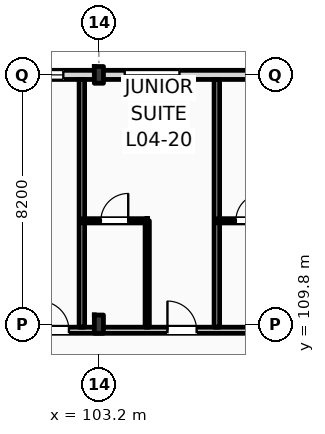
"""IFC4 building model, lengths in metres.
Left out: names, types, materials, properties, quantities, classifications, styles, units other than length and angle.
Written with IfcOpenShell. Run it as: python <this file> out.ifc"""

import sys

from ifc_helpers import new_model, si_unit, direction, frame, frame_2d, origin, origin_2d, place, context, subcontext, project, spatial, rectangle, i_section, extrude, element, fill, save


model = new_model("IFC4")
c1 = context("Model", 3, precision=1e-05, world=origin(), true_north=direction((0.0, 1.0)))
c2 = subcontext(c1, "Body", "Model", "MODEL_VIEW")
j1 = project(units=[si_unit("LENGTHUNIT", "METRE"), si_unit("PLANEANGLEUNIT", "RADIAN")], contexts=[c1])
p1 = place(None, origin())
s1 = spatial("IfcSite", under=j1, at=p1, CompositionType="ELEMENT")
p2 = place(p1, origin())
s2 = spatial("IfcBuilding", under=s1, at=p2, CompositionType="ELEMENT")
p3 = place(p2, frame((0.0, 0.0, 20.4)))
s3 = spatial("IfcBuildingStorey", under=s2, at=p3, CompositionType="ELEMENT", Elevation=20.4)
p4 = place(p3, frame((103.2, 109.8, 0.0), z_axis=(0.0, 0.0, 1.0), x_axis=(1.0, 0.0, 0.0)))
e1 = element("IfcColumn", 1, at=p4, inside=s3, PredefinedType="COLUMN", context=c2, shape_type="SweptSolid", body=[
    extrude(i_section(OverallWidth=0.3, OverallDepth=0.6, WebThickness=0.015, FlangeThickness=0.03, FilletRadius=0.027, at=origin_2d()), origin(), (0.0, 0.0, 1.0), 4.2),
])
p5 = place(p3, frame((103.2, 118.0, 0.0), z_axis=(0.0, 0.0, 1.0), x_axis=(1.0, 0.0, 0.0)))
e2 = element("IfcColumn", 2, at=p5, inside=s3, PredefinedType="COLUMN", context=c2, shape_type="SweptSolid", body=[
    extrude(i_section(OverallWidth=0.3, OverallDepth=0.55, WebThickness=0.015, FlangeThickness=0.029, FilletRadius=0.027, at=origin_2d()), origin(), (0.0, 0.0, 1.0), 4.2),
])
p6 = place(p3, frame((22.5, 118.0, 0.0), z_axis=(0.0, 0.0, 1.0), x_axis=(1.0, 0.0, 0.0)))
e3 = element("IfcWall", 3, at=p6, inside=s3, PredefinedType="STANDARD", context=c2, shape_type="SweptSolid", body=[
    extrude(rectangle(XDim=97.5, YDim=0.3, at=frame_2d((48.75, 0.0))), origin(), (0.0, 0.0, 1.0), 3.38),
])
p7 = place(p6, frame((0.91, 0.0, 0.9)))
e4 = element("IfcOpeningElement", 4, at=p7, cuts=e3, PredefinedType="OPENING", context=c2, shape_type="SweptSolid", body=[
    extrude(rectangle(XDim=0.9, YDim=1.8, at=frame_2d((0.45, 0.9))), frame((0.0, 0.16, 0.0), z_axis=(0.0, -1.0, 0.0), x_axis=(1.0, 0.0, 0.0)), (0.0, 0.0, 1.0), 0.32),
])
p8 = place(p6, frame((6.36, 0.0, 0.0)))
e5 = element("IfcOpeningElement", 5, at=p8, cuts=e3, PredefinedType="OPENING", context=c2, shape_type="SweptSolid", body=[
    extrude(rectangle(XDim=1.2, YDim=2.25, at=frame_2d((0.6, 1.125))), frame((0.0, 0.16, 0.0), z_axis=(0.0, -1.0, 0.0), x_axis=(1.0, 0.0, 0.0)), (0.0, 0.0, 1.0), 0.32),
])
p9 = place(p6, frame((11.41, 0.0, 0.9)))
e6 = element("IfcOpeningElement", 6, at=p9, cuts=e3, PredefinedType="OPENING", context=c2, shape_type="SweptSolid", body=[
    extrude(rectangle(XDim=1.1, YDim=1.9, at=frame_2d((0.55, 0.95))), frame((0.0, 0.16, 0.0), z_axis=(0.0, -1.0, 0.0), x_axis=(1.0, 0.0, 0.0)), (0.0, 0.0, 1.0), 0.32),
])
p10 = place(p6, frame((14.335, 0.0, 0.9)))
e7 = element("IfcOpeningElement", 7, at=p10, cuts=e3, PredefinedType="OPENING", context=c2, shape_type="SweptSolid", body=[
    extrude(rectangle(XDim=1.65, YDim=1.95, at=frame_2d((0.825, 0.975))), frame((0.0, 0.16, 0.0), z_axis=(0.0, -1.0, 0.0), x_axis=(1.0, 0.0, 0.0)), (0.0, 0.0, 1.0), 0.32),
])
p11 = place(p6, frame((19.26, 0.0, 0.9)))
e8 = element("IfcOpeningElement", 8, at=p11, cuts=e3, PredefinedType="OPENING", context=c2, shape_type="SweptSolid", body=[
    extrude(rectangle(XDim=1.35, YDim=2.0, at=frame_2d((0.675, 1.0))), frame((0.0, 0.16, 0.0), z_axis=(0.0, -1.0, 0.0), x_axis=(1.0, 0.0, 0.0)), (0.0, 0.0, 1.0), 0.32),
])
p12 = place(p6, frame((22.8, 0.0, 0.0)))
e9 = element("IfcOpeningElement", 9, at=p12, cuts=e3, PredefinedType="OPENING", context=c2, shape_type="SweptSolid", body=[
    extrude(rectangle(XDim=1.2, YDim=2.25, at=frame_2d((0.6, 1.125))), frame((0.0, 0.16, 0.0), z_axis=(0.0, -1.0, 0.0), x_axis=(1.0, 0.0, 0.0)), (0.0, 0.0, 1.0), 0.32),
])
p13 = place(p6, frame((26.91, 0.0, 0.9)))
e10 = element("IfcOpeningElement", 10, at=p13, cuts=e3, PredefinedType="OPENING", context=c2, shape_type="SweptSolid", body=[
    extrude(rectangle(XDim=2.1, YDim=2.1, at=frame_2d((1.05, 1.05))), frame((0.0, 0.16, 0.0), z_axis=(0.0, -1.0, 0.0), x_axis=(1.0, 0.0, 0.0)), (0.0, 0.0, 1.0), 0.32),
])
p14 = place(p6, frame((30.835, 0.0, 0.9)))
e11 = element("IfcOpeningElement", 11, at=p14, cuts=e3, PredefinedType="OPENING", context=c2, shape_type="SweptSolid", body=[
    extrude(rectangle(XDim=2.25, YDim=2.15, at=frame_2d((1.125, 1.075))), frame((0.0, 0.16, 0.0), z_axis=(0.0, -1.0, 0.0), x_axis=(1.0, 0.0, 0.0)), (0.0, 0.0, 1.0), 0.32),
])
p15 = place(p6, frame((34.96, 0.0, 0.9)))
e12 = element("IfcOpeningElement", 12, at=p15, cuts=e3, PredefinedType="OPENING", context=c2, shape_type="SweptSolid", body=[
    extrude(rectangle(XDim=2.4, YDim=2.2, at=frame_2d((1.2, 1.1))), frame((0.0, 0.16, 0.0), z_axis=(0.0, -1.0, 0.0), x_axis=(1.0, 0.0, 0.0)), (0.0, 0.0, 1.0), 0.32),
])
p16 = place(p6, frame((39.0, 0.0, 0.0)))
e13 = element("IfcOpeningElement", 13, at=p16, cuts=e3, PredefinedType="OPENING", context=c2, shape_type="SweptSolid", body=[
    extrude(rectangle(XDim=1.2, YDim=2.25, at=frame_2d((0.6, 1.125))), frame((0.0, 0.16, 0.0), z_axis=(0.0, -1.0, 0.0), x_axis=(1.0, 0.0, 0.0)), (0.0, 0.0, 1.0), 0.32),
])
p17 = place(p6, frame((43.21, 0.0, 0.9)))
e14 = element("IfcOpeningElement", 14, at=p17, cuts=e3, PredefinedType="OPENING", context=c2, shape_type="SweptSolid", body=[
    extrude(rectangle(XDim=2.7, YDim=2.3, at=frame_2d((1.35, 1.15))), frame((0.0, 0.16, 0.0), z_axis=(0.0, -1.0, 0.0), x_axis=(1.0, 0.0, 0.0)), (0.0, 0.0, 1.0), 0.32),
])
p18 = place(p6, frame((47.335, 0.0, 0.9)))
e15 = element("IfcOpeningElement", 15, at=p18, cuts=e3, PredefinedType="OPENING", context=c2, shape_type="SweptSolid", body=[
    extrude(rectangle(XDim=1.35, YDim=2.3, at=frame_2d((0.675, 1.15))), frame((0.0, 0.16, 0.0), z_axis=(0.0, -1.0, 0.0), x_axis=(1.0, 0.0, 0.0)), (0.0, 0.0, 1.0), 0.32),
])
p19 = place(p6, frame((52.74, 0.0, 0.0)))
e16 = element("IfcOpeningElement", 16, at=p19, cuts=e3, PredefinedType="OPENING", context=c2, shape_type="SweptSolid", body=[
    extrude(rectangle(XDim=1.2, YDim=2.25, at=frame_2d((0.6, 1.125))), frame((0.0, 0.16, 0.0), z_axis=(0.0, -1.0, 0.0), x_axis=(1.0, 0.0, 0.0)), (0.0, 0.0, 1.0), 0.32),
])
p20 = place(p6, frame((55.36, 0.0, 0.9)))
e17 = element("IfcOpeningElement", 17, at=p20, cuts=e3, PredefinedType="OPENING", context=c2, shape_type="SweptSolid", body=[
    extrude(rectangle(XDim=1.1, YDim=2.3, at=frame_2d((0.55, 1.15))), frame((0.0, 0.16, 0.0), z_axis=(0.0, -1.0, 0.0), x_axis=(1.0, 0.0, 0.0)), (0.0, 0.0, 1.0), 0.32),
])
p21 = place(p6, frame((59.99, 0.0, 0.9)))
e18 = element("IfcOpeningElement", 18, at=p21, cuts=e3, PredefinedType="OPENING", context=c2, shape_type="SweptSolid", body=[
    extrude(rectangle(XDim=2.74, YDim=2.3, at=frame_2d((1.37, 1.15))), frame((0.0, 0.16, 0.0), z_axis=(0.0, -1.0, 0.0), x_axis=(1.0, 0.0, 0.0)), (0.0, 0.0, 1.0), 0.32),
])
p22 = place(p6, frame((65.95, 0.0, 0.9)))
e19 = element("IfcOpeningElement", 19, at=p22, cuts=e3, PredefinedType="OPENING", context=c2, shape_type="SweptSolid", body=[
    extrude(rectangle(XDim=1.35, YDim=2.3, at=frame_2d((0.675, 1.15))), frame((0.0, 0.16, 0.0), z_axis=(0.0, -1.0, 0.0), x_axis=(1.0, 0.0, 0.0)), (0.0, 0.0, 1.0), 0.32),
])
p23 = place(p6, frame((69.16, 0.0, 0.0)))
e20 = element("IfcOpeningElement", 20, at=p23, cuts=e3, PredefinedType="OPENING", context=c2, shape_type="SweptSolid", body=[
    extrude(rectangle(XDim=1.2, YDim=2.25, at=frame_2d((0.6, 1.125))), frame((0.0, 0.16, 0.0), z_axis=(0.0, -1.0, 0.0), x_axis=(1.0, 0.0, 0.0)), (0.0, 0.0, 1.0), 0.32),
])
p24 = place(p6, frame((73.75, 0.0, 0.9)))
e21 = element("IfcOpeningElement", 21, at=p24, cuts=e3, PredefinedType="OPENING", context=c2, shape_type="SweptSolid", body=[
    extrude(rectangle(XDim=1.8, YDim=2.3, at=frame_2d((0.9, 1.15))), frame((0.0, 0.16, 0.0), z_axis=(0.0, -1.0, 0.0), x_axis=(1.0, 0.0, 0.0)), (0.0, 0.0, 1.0), 0.32),
])
p25 = place(p6, frame((76.79, 0.0, 0.9)))
e22 = element("IfcOpeningElement", 22, at=p25, cuts=e3, PredefinedType="OPENING", context=c2, shape_type="SweptSolid", body=[
    extrude(rectangle(XDim=2.74, YDim=2.3, at=frame_2d((1.37, 1.15))), frame((0.0, 0.16, 0.0), z_axis=(0.0, -1.0, 0.0), x_axis=(1.0, 0.0, 0.0)), (0.0, 0.0, 1.0), 0.32),
])
p26 = place(p6, frame((81.55, 0.0, 0.9)))
e23 = element("IfcOpeningElement", 23, at=p26, cuts=e3, PredefinedType="OPENING", context=c2, shape_type="SweptSolid", body=[
    extrude(rectangle(XDim=1.8, YDim=2.3, at=frame_2d((0.9, 1.15))), frame((0.0, 0.16, 0.0), z_axis=(0.0, -1.0, 0.0), x_axis=(1.0, 0.0, 0.0)), (0.0, 0.0, 1.0), 0.32),
])
p27 = place(p6, frame((86.01, 0.0, 0.9)))
e24 = element("IfcOpeningElement", 24, at=p27, cuts=e3, PredefinedType="OPENING", context=c2, shape_type="SweptSolid", body=[
    extrude(rectangle(XDim=1.1, YDim=1.5, at=frame_2d((0.55, 0.75))), frame((0.0, 0.16, 0.0), z_axis=(0.0, -1.0, 0.0), x_axis=(1.0, 0.0, 0.0)), (0.0, 0.0, 1.0), 0.32),
])
p28 = place(p6, frame((90.135, 0.0, 0.9)))
e25 = element("IfcOpeningElement", 25, at=p28, cuts=e3, PredefinedType="OPENING", context=c2, shape_type="SweptSolid", body=[
    extrude(rectangle(XDim=1.25, YDim=1.6, at=frame_2d((0.625, 0.8))), frame((0.0, 0.16, 0.0), z_axis=(0.0, -1.0, 0.0), x_axis=(1.0, 0.0, 0.0)), (0.0, 0.0, 1.0), 0.32),
])
p29 = place(p6, frame((94.34, 0.0, 0.9)))
e26 = element("IfcOpeningElement", 26, at=p29, cuts=e3, PredefinedType="OPENING", context=c2, shape_type="SweptSolid", body=[
    extrude(rectangle(XDim=1.4, YDim=1.7, at=frame_2d((0.7, 0.85))), frame((0.0, 0.16, 0.0), z_axis=(0.0, -1.0, 0.0), x_axis=(1.0, 0.0, 0.0)), (0.0, 0.0, 1.0), 0.32),
])
p30 = place(p3, frame((10.65, 109.6, 0.0), z_axis=(0.0, 0.0, 1.0), x_axis=(1.0, 0.0, 0.0)))
e27 = element("IfcWall", 27, at=p30, inside=s3, PredefinedType="PARTITIONING", context=c2, shape_type="SweptSolid", body=[
    extrude(rectangle(XDim=109.21, YDim=0.2, at=frame_2d((54.605, 0.0))), origin(), (0.0, 0.0, 1.0), 3.38),
])
p31 = place(p30, frame((12.535, 0.0, 0.0)))
e28 = element("IfcOpeningElement", 28, at=p31, cuts=e27, PredefinedType="OPENING", context=c2, shape_type="SweptSolid", body=[
    extrude(rectangle(XDim=1.02, YDim=2.2, at=frame_2d((0.51, 1.1))), frame((0.0, 0.11, 0.0), z_axis=(0.0, -1.0, 0.0), x_axis=(1.0, 0.0, 0.0)), (0.0, 0.0, 1.0), 0.22),
])
p32 = place(p30, frame((19.175, 0.0, 0.0)))
e29 = element("IfcOpeningElement", 29, at=p32, cuts=e27, PredefinedType="OPENING", context=c2, shape_type="SweptSolid", body=[
    extrude(rectangle(XDim=1.02, YDim=2.2, at=frame_2d((0.51, 1.1))), frame((0.0, 0.11, 0.0), z_axis=(0.0, -1.0, 0.0), x_axis=(1.0, 0.0, 0.0)), (0.0, 0.0, 1.0), 0.22),
])
p33 = place(p30, frame((23.375, 0.0, 0.0)))
e30 = element("IfcOpeningElement", 30, at=p33, cuts=e27, PredefinedType="OPENING", context=c2, shape_type="SweptSolid", body=[
    extrude(rectangle(XDim=1.02, YDim=2.2, at=frame_2d((0.51, 1.1))), frame((0.0, 0.11, 0.0), z_axis=(0.0, -1.0, 0.0), x_axis=(1.0, 0.0, 0.0)), (0.0, 0.0, 1.0), 0.22),
])
p34 = place(p30, frame((27.575, 0.0, 0.0)))
e31 = element("IfcOpeningElement", 31, at=p34, cuts=e27, PredefinedType="OPENING", context=c2, shape_type="SweptSolid", body=[
    extrude(rectangle(XDim=1.02, YDim=2.2, at=frame_2d((0.51, 1.1))), frame((0.0, 0.11, 0.0), z_axis=(0.0, -1.0, 0.0), x_axis=(1.0, 0.0, 0.0)), (0.0, 0.0, 1.0), 0.22),
])
p35 = place(p30, frame((31.805, 0.0, 0.0)))
e32 = element("IfcOpeningElement", 32, at=p35, cuts=e27, PredefinedType="OPENING", context=c2, shape_type="SweptSolid", body=[
    extrude(rectangle(XDim=0.96, YDim=2.2, at=frame_2d((0.48, 1.1))), frame((0.0, 0.11, 0.0), z_axis=(0.0, -1.0, 0.0), x_axis=(1.0, 0.0, 0.0)), (0.0, 0.0, 1.0), 0.22),
])
p36 = place(p30, frame((33.855, 0.0, 0.0)))
e33 = element("IfcOpeningElement", 33, at=p36, cuts=e27, PredefinedType="OPENING", context=c2, shape_type="SweptSolid", body=[
    extrude(rectangle(XDim=0.96, YDim=2.2, at=frame_2d((0.48, 1.1))), frame((0.0, 0.11, 0.0), z_axis=(0.0, -1.0, 0.0), x_axis=(1.0, 0.0, 0.0)), (0.0, 0.0, 1.0), 0.22),
])
p37 = place(p30, frame((40.205, 0.0, 0.0)))
e34 = element("IfcOpeningElement", 34, at=p37, cuts=e27, PredefinedType="OPENING", context=c2, shape_type="SweptSolid", body=[
    extrude(rectangle(XDim=0.96, YDim=2.2, at=frame_2d((0.48, 1.1))), frame((0.0, 0.11, 0.0), z_axis=(0.0, -1.0, 0.0), x_axis=(1.0, 0.0, 0.0)), (0.0, 0.0, 1.0), 0.22),
])
p38 = place(p30, frame((42.255, 0.0, 0.0)))
e35 = element("IfcOpeningElement", 35, at=p38, cuts=e27, PredefinedType="OPENING", context=c2, shape_type="SweptSolid", body=[
    extrude(rectangle(XDim=0.96, YDim=2.2, at=frame_2d((0.48, 1.1))), frame((0.0, 0.11, 0.0), z_axis=(0.0, -1.0, 0.0), x_axis=(1.0, 0.0, 0.0)), (0.0, 0.0, 1.0), 0.22),
])
p39 = place(p30, frame((48.605, 0.0, 0.0)))
e36 = element("IfcOpeningElement", 36, at=p39, cuts=e27, PredefinedType="OPENING", context=c2, shape_type="SweptSolid", body=[
    extrude(rectangle(XDim=0.96, YDim=2.2, at=frame_2d((0.48, 1.1))), frame((0.0, 0.11, 0.0), z_axis=(0.0, -1.0, 0.0), x_axis=(1.0, 0.0, 0.0)), (0.0, 0.0, 1.0), 0.22),
])
p40 = place(p30, frame((50.655, 0.0, 0.0)))
e37 = element("IfcOpeningElement", 37, at=p40, cuts=e27, PredefinedType="OPENING", context=c2, shape_type="SweptSolid", body=[
    extrude(rectangle(XDim=0.96, YDim=2.2, at=frame_2d((0.48, 1.1))), frame((0.0, 0.11, 0.0), z_axis=(0.0, -1.0, 0.0), x_axis=(1.0, 0.0, 0.0)), (0.0, 0.0, 1.0), 0.22),
])
p41 = place(p30, frame((57.005, 0.0, 0.0)))
e38 = element("IfcOpeningElement", 38, at=p41, cuts=e27, PredefinedType="OPENING", context=c2, shape_type="SweptSolid", body=[
    extrude(rectangle(XDim=0.96, YDim=2.2, at=frame_2d((0.48, 1.1))), frame((0.0, 0.11, 0.0), z_axis=(0.0, -1.0, 0.0), x_axis=(1.0, 0.0, 0.0)), (0.0, 0.0, 1.0), 0.22),
])
p42 = place(p30, frame((59.055, 0.0, 0.0)))
e39 = element("IfcOpeningElement", 39, at=p42, cuts=e27, PredefinedType="OPENING", context=c2, shape_type="SweptSolid", body=[
    extrude(rectangle(XDim=0.96, YDim=2.2, at=frame_2d((0.48, 1.1))), frame((0.0, 0.11, 0.0), z_axis=(0.0, -1.0, 0.0), x_axis=(1.0, 0.0, 0.0)), (0.0, 0.0, 1.0), 0.22),
])
p43 = place(p30, frame((65.405, 0.0, 0.0)))
e40 = element("IfcOpeningElement", 40, at=p43, cuts=e27, PredefinedType="OPENING", context=c2, shape_type="SweptSolid", body=[
    extrude(rectangle(XDim=0.96, YDim=2.2, at=frame_2d((0.48, 1.1))), frame((0.0, 0.11, 0.0), z_axis=(0.0, -1.0, 0.0), x_axis=(1.0, 0.0, 0.0)), (0.0, 0.0, 1.0), 0.22),
])
p44 = place(p30, frame((67.205, 0.0, 0.0)))
e41 = element("IfcOpeningElement", 41, at=p44, cuts=e27, PredefinedType="OPENING", context=c2, shape_type="SweptSolid", body=[
    extrude(rectangle(XDim=0.96, YDim=2.2, at=frame_2d((0.48, 1.1))), frame((0.0, 0.11, 0.0), z_axis=(0.0, -1.0, 0.0), x_axis=(1.0, 0.0, 0.0)), (0.0, 0.0, 1.0), 0.22),
])
p45 = place(p30, frame((73.805, 0.0, 0.0)))
e42 = element("IfcOpeningElement", 42, at=p45, cuts=e27, PredefinedType="OPENING", context=c2, shape_type="SweptSolid", body=[
    extrude(rectangle(XDim=0.96, YDim=2.2, at=frame_2d((0.48, 1.1))), frame((0.0, 0.11, 0.0), z_axis=(0.0, -1.0, 0.0), x_axis=(1.0, 0.0, 0.0)), (0.0, 0.0, 1.0), 0.22),
])
p46 = place(p30, frame((78.255, 0.0, 0.0)))
e43 = element("IfcOpeningElement", 43, at=p46, cuts=e27, PredefinedType="OPENING", context=c2, shape_type="SweptSolid", body=[
    extrude(rectangle(XDim=0.96, YDim=2.2, at=frame_2d((0.48, 1.1))), frame((0.0, 0.11, 0.0), z_axis=(0.0, -1.0, 0.0), x_axis=(1.0, 0.0, 0.0)), (0.0, 0.0, 1.0), 0.22),
])
p47 = place(p30, frame((82.205, 0.0, 0.0)))
e44 = element("IfcOpeningElement", 44, at=p47, cuts=e27, PredefinedType="OPENING", context=c2, shape_type="SweptSolid", body=[
    extrude(rectangle(XDim=0.96, YDim=2.2, at=frame_2d((0.48, 1.1))), frame((0.0, 0.11, 0.0), z_axis=(0.0, -1.0, 0.0), x_axis=(1.0, 0.0, 0.0)), (0.0, 0.0, 1.0), 0.22),
])
p48 = place(p30, frame((86.405, 0.0, 0.0)))
e45 = element("IfcOpeningElement", 45, at=p48, cuts=e27, PredefinedType="OPENING", context=c2, shape_type="SweptSolid", body=[
    extrude(rectangle(XDim=0.96, YDim=2.2, at=frame_2d((0.48, 1.1))), frame((0.0, 0.11, 0.0), z_axis=(0.0, -1.0, 0.0), x_axis=(1.0, 0.0, 0.0)), (0.0, 0.0, 1.0), 0.22),
])
p49 = place(p30, frame((90.605, 0.0, 0.0)))
e46 = element("IfcOpeningElement", 46, at=p49, cuts=e27, PredefinedType="OPENING", context=c2, shape_type="SweptSolid", body=[
    extrude(rectangle(XDim=0.96, YDim=2.2, at=frame_2d((0.48, 1.1))), frame((0.0, 0.11, 0.0), z_axis=(0.0, -1.0, 0.0), x_axis=(1.0, 0.0, 0.0)), (0.0, 0.0, 1.0), 0.22),
])
p50 = place(p30, frame((94.805, 0.0, 0.0)))
e47 = element("IfcOpeningElement", 47, at=p50, cuts=e27, PredefinedType="OPENING", context=c2, shape_type="SweptSolid", body=[
    extrude(rectangle(XDim=0.96, YDim=2.2, at=frame_2d((0.48, 1.1))), frame((0.0, 0.11, 0.0), z_axis=(0.0, -1.0, 0.0), x_axis=(1.0, 0.0, 0.0)), (0.0, 0.0, 1.0), 0.22),
])
p51 = place(p30, frame((99.005, 0.0, 0.0)))
e48 = element("IfcOpeningElement", 48, at=p51, cuts=e27, PredefinedType="OPENING", context=c2, shape_type="SweptSolid", body=[
    extrude(rectangle(XDim=0.96, YDim=2.2, at=frame_2d((0.48, 1.1))), frame((0.0, 0.11, 0.0), z_axis=(0.0, -1.0, 0.0), x_axis=(1.0, 0.0, 0.0)), (0.0, 0.0, 1.0), 0.22),
])
p52 = place(p30, frame((103.205, 0.0, 0.0)))
e49 = element("IfcOpeningElement", 49, at=p52, cuts=e27, PredefinedType="OPENING", context=c2, shape_type="SweptSolid", body=[
    extrude(rectangle(XDim=0.96, YDim=2.2, at=frame_2d((0.48, 1.1))), frame((0.0, 0.11, 0.0), z_axis=(0.0, -1.0, 0.0), x_axis=(1.0, 0.0, 0.0)), (0.0, 0.0, 1.0), 0.22),
])
p53 = place(p30, frame((105.335, 0.0, 0.0)))
e50 = element("IfcOpeningElement", 50, at=p53, cuts=e27, PredefinedType="OPENING", context=c2, shape_type="SweptSolid", body=[
    extrude(rectangle(XDim=0.96, YDim=2.2, at=frame_2d((0.48, 1.1))), frame((0.0, 0.11, 0.0), z_axis=(0.0, -1.0, 0.0), x_axis=(1.0, 0.0, 0.0)), (0.0, 0.0, 1.0), 0.22),
])
p54 = place(p30, frame((2.716, 0.0, 0.0)))
e51 = element("IfcOpeningElement", 51, at=p54, cuts=e27, PredefinedType="OPENING", context=c2, shape_type="SweptSolid", body=[
    extrude(rectangle(XDim=1.35, YDim=2.25, at=frame_2d((0.675, 1.125))), frame((0.0, 0.11, 0.0), z_axis=(0.0, -1.0, 0.0), x_axis=(1.0, 0.0, 0.0)), (0.0, 0.0, 1.0), 0.22),
])
p55 = place(p30, frame((6.65, 0.0, 0.0)))
e52 = element("IfcOpeningElement", 52, at=p55, cuts=e27, PredefinedType="OPENING", context=c2, shape_type="SweptSolid", body=[
    extrude(rectangle(XDim=1.35, YDim=2.25, at=frame_2d((0.675, 1.125))), frame((0.0, 0.11, 0.0), z_axis=(0.0, -1.0, 0.0), x_axis=(1.0, 0.0, 0.0)), (0.0, 0.0, 1.0), 0.22),
])
p56 = place(p30, frame((10.583, 0.0, 0.0)))
e53 = element("IfcOpeningElement", 53, at=p56, cuts=e27, PredefinedType="OPENING", context=c2, shape_type="SweptSolid", body=[
    extrude(rectangle(XDim=1.35, YDim=2.25, at=frame_2d((0.675, 1.125))), frame((0.0, 0.11, 0.0), z_axis=(0.0, -1.0, 0.0), x_axis=(1.0, 0.0, 0.0)), (0.0, 0.0, 1.0), 0.22),
])
for number, where, z_axis, x_axis in (
    (54, (102.64, 109.7, 0.0), (0.0, 0.0, 1.0), (0.0, 1.0, 0.0)),
    (55, (107.08, 109.7, 0.0), (0.0, 0.0, 1.0), (0.0, 1.0, 0.0)),
):
    element("IfcWall", number, at=place(p3, frame(where, z_axis=z_axis, x_axis=x_axis)), inside=s3, PredefinedType="PARTITIONING", context=c2, shape_type="SweptSolid", body=[
        extrude(rectangle(XDim=8.15, YDim=0.18, at=frame_2d((4.075, 0.0))), origin(), (0.0, 0.0, 1.0), 3.94),
    ])
p57 = place(p3, frame((104.79, 109.7, 0.0), z_axis=(0.0, 0.0, 1.0), x_axis=(0.0, 1.0, 0.0)))
e56 = element("IfcWall", 56, at=p57, inside=s3, PredefinedType="PARTITIONING", context=c2, shape_type="SweptSolid", body=[
    extrude(rectangle(XDim=3.5, YDim=0.14, at=frame_2d((1.75, 0.0))), origin(), (0.0, 0.0, 1.0), 3.94),
])
p58 = place(p3, frame((102.64, 113.2, 0.0), z_axis=(0.0, 0.0, 1.0), x_axis=(1.0, 0.0, 0.0)))
e57 = element("IfcWall", 57, at=p58, inside=s3, PredefinedType="PARTITIONING", context=c2, shape_type="SweptSolid", body=[
    extrude(rectangle(XDim=2.15, YDim=0.14, at=frame_2d((1.075, 0.0))), origin(), (0.0, 0.0, 1.0), 3.94),
])
p59 = place(p58, frame((0.625, 0.0, 0.0)))
e58 = element("IfcOpeningElement", 58, at=p59, cuts=e57, PredefinedType="OPENING", context=c2, shape_type="SweptSolid", body=[
    extrude(rectangle(XDim=0.9, YDim=2.1, at=frame_2d((0.45, 1.05))), frame((0.0, 0.08, 0.0), z_axis=(0.0, -1.0, 0.0), x_axis=(1.0, 0.0, 0.0)), (0.0, 0.0, 1.0), 0.16),
])
p60 = place(p3, frame((107.08, 113.2, 0.0), z_axis=(0.0, 0.0, 1.0), x_axis=(1.0, 0.0, 0.0)))
e59 = element("IfcWall", 59, at=p60, inside=s3, PredefinedType="PARTITIONING", context=c2, shape_type="SweptSolid", body=[
    extrude(rectangle(XDim=2.15, YDim=0.14, at=frame_2d((1.075, 0.0))), origin(), (0.0, 0.0, 1.0), 3.94),
])
p61 = place(p60, frame((0.625, 0.0, 0.0)))
e60 = element("IfcOpeningElement", 60, at=p61, cuts=e59, PredefinedType="OPENING", context=c2, shape_type="SweptSolid", body=[
    extrude(rectangle(XDim=0.9, YDim=2.1, at=frame_2d((0.45, 1.05))), frame((0.0, 0.08, 0.0), z_axis=(0.0, -1.0, 0.0), x_axis=(1.0, 0.0, 0.0)), (0.0, 0.0, 1.0), 0.16),
])
p62 = place(p25, origin())
e61 = element("IfcWindow", 61, at=p62, inside=s3, PartitioningType="DOUBLE_PANEL_VERTICAL", PredefinedType="WINDOW", context=c2, shape_type="SweptSolid", body=[
    extrude(rectangle(XDim=2.74, YDim=2.3, at=frame_2d((1.37, 1.15))), frame((0.0, 0.03, 0.0), z_axis=(0.0, -1.0, 0.0), x_axis=(1.0, 0.0, 0.0)), (0.0, 0.0, 1.0), 0.06),
])
fill(e22, e61)
p63 = place(p26, origin())
e62 = element("IfcWindow", 62, at=p63, inside=s3, PartitioningType="DOUBLE_PANEL_VERTICAL", PredefinedType="WINDOW", context=c2, shape_type="SweptSolid", body=[
    extrude(rectangle(XDim=1.8, YDim=2.3, at=frame_2d((0.9, 1.15))), frame((0.0, 0.03, 0.0), z_axis=(0.0, -1.0, 0.0), x_axis=(1.0, 0.0, 0.0)), (0.0, 0.0, 1.0), 0.06),
])
fill(e23, e62)
p64 = place(p49, origin())
e63 = element("IfcDoor", 63, at=p64, inside=s3, OperationType="SINGLE_SWING_LEFT", PredefinedType="DOOR", context=c2, shape_type="SweptSolid", body=[
    extrude(rectangle(XDim=0.96, YDim=2.2, at=frame_2d((0.48, 1.1))), frame((0.0, 0.025, 0.0), z_axis=(0.0, -1.0, 0.0), x_axis=(1.0, 0.0, 0.0)), (0.0, 0.0, 1.0), 0.05),
])
fill(e46, e63)
p65 = place(p50, origin())
e64 = element("IfcDoor", 64, at=p65, inside=s3, OperationType="SINGLE_SWING_LEFT", PredefinedType="DOOR", context=c2, shape_type="SweptSolid", body=[
    extrude(rectangle(XDim=0.96, YDim=2.2, at=frame_2d((0.48, 1.1))), frame((0.0, 0.025, 0.0), z_axis=(0.0, -1.0, 0.0), x_axis=(1.0, 0.0, 0.0)), (0.0, 0.0, 1.0), 0.05),
])
fill(e47, e64)
p66 = place(p59, origin())
e65 = element("IfcDoor", 65, at=p66, inside=s3, OperationType="SINGLE_SWING_RIGHT", PredefinedType="DOOR", context=c2, shape_type="SweptSolid", body=[
    extrude(rectangle(XDim=0.9, YDim=2.1, at=frame_2d((0.45, 1.05))), frame((0.0, 0.025, 0.0), z_axis=(0.0, -1.0, 0.0), x_axis=(1.0, 0.0, 0.0)), (0.0, 0.0, 1.0), 0.05),
])
fill(e58, e65)
p67 = place(p61, origin())
e66 = element("IfcDoor", 66, at=p67, inside=s3, OperationType="SINGLE_SWING_RIGHT", PredefinedType="DOOR", context=c2, shape_type="SweptSolid", body=[
    extrude(rectangle(XDim=0.9, YDim=2.1, at=frame_2d((0.45, 1.05))), frame((0.0, 0.025, 0.0), z_axis=(0.0, -1.0, 0.0), x_axis=(1.0, 0.0, 0.0)), (0.0, 0.0, 1.0), 0.05),
])
fill(e60, e66)
save(model, sys.argv[1])
